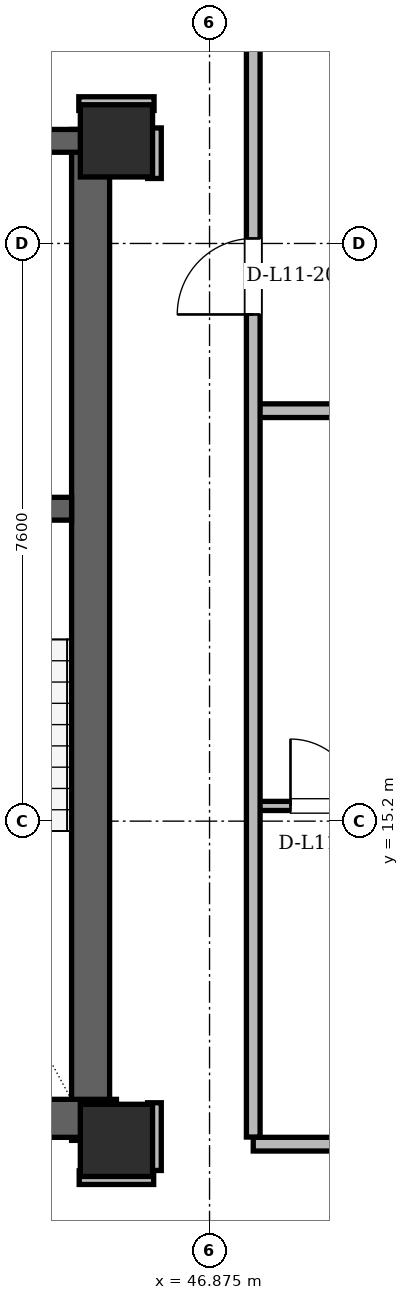
"""IFC4 building model, lengths in metres.
Left out: names, types, materials, properties, quantities, classifications, styles, units other than length and angle.
Written with IfcOpenShell. Run it as: python <this file> out.ifc"""

import sys

from ifc_helpers import new_model, si_unit, direction, frame, frame_2d, origin, origin_2d, place, context, subcontext, project, spatial, rectangle, hollow_rectangle, extrude, element, fill, save


model = new_model("IFC4")
c1 = context("Model", 3, precision=1e-05, world=origin(), true_north=direction((0.0, 1.0)))
c2 = subcontext(c1, "Body", "Model", "MODEL_VIEW")
j1 = project(units=[si_unit("LENGTHUNIT", "METRE"), si_unit("PLANEANGLEUNIT", "RADIAN")], contexts=[c1])
p1 = place(None, origin())
s1 = spatial("IfcSite", under=j1, at=p1, CompositionType="ELEMENT")
p2 = place(p1, origin())
s2 = spatial("IfcBuilding", under=s1, at=p2, CompositionType="ELEMENT")
p3 = place(p2, frame((0.0, 0.0, 45.3)))
s3 = spatial("IfcBuildingStorey", under=s2, at=p3, CompositionType="ELEMENT", Elevation=45.3)
for number, where, z_axis, x_axis in (
    (1, (45.65, 11.0, 0.0), (0.0, 0.0, 1.0), (1.0, 0.0, 0.0)),
    (2, (45.65, 24.15, 0.0), (0.0, 0.0, 1.0), (1.0, 0.0, 0.0)),
):
    element("IfcColumn", number, at=place(p3, frame(where, z_axis=z_axis, x_axis=x_axis)), inside=s3, PredefinedType="COLUMN", context=c2, shape_type="SweptSolid", body=[
        extrude(hollow_rectangle(XDim=0.95, YDim=0.95, WallThickness=0.08, at=origin_2d()), origin(), (0.0, 0.0, 1.0), 3.6),
    ])
p4 = place(p3, frame((45.31, 11.0, 0.0), z_axis=(0.0, 0.0, 1.0), x_axis=(0.0, 1.0, 0.0)))
e3 = element("IfcWall", 3, at=p4, inside=s3, PredefinedType="SHEAR", context=c2, shape_type="SweptSolid", body=[
    extrude(rectangle(XDim=13.3, YDim=0.5, at=frame_2d((6.65, 0.0))), origin(), (0.0, 0.0, 1.0), 3.36),
])
p5 = place(p3, frame((38.55, 11.29, 0.0), z_axis=(0.0, 0.0, 1.0), x_axis=(1.0, 0.0, 0.0)))
e4 = element("IfcWall", 4, at=p5, inside=s3, PredefinedType="SHEAR", context=c2, shape_type="SweptSolid", body=[
    extrude(rectangle(XDim=7.1, YDim=0.5, at=frame_2d((3.55, 0.0))), origin(), (0.0, 0.0, 1.0), 3.36),
])
p6 = place(p3, frame((29.65, 24.15, 0.0), z_axis=(0.0, 0.0, 1.0), x_axis=(1.0, 0.0, 0.0)))
e5 = element("IfcWall", 5, at=p6, inside=s3, PredefinedType="SHEAR", context=c2, shape_type="SweptSolid", body=[
    extrude(rectangle(XDim=15.7, YDim=0.3, at=frame_2d((7.85, 0.0))), origin(), (0.0, 0.0, 1.0), 3.36),
])
p7 = place(p6, frame((1.7, 0.0, 0.0)))
e6 = element("IfcOpeningElement", 6, at=p7, cuts=e5, PredefinedType="OPENING", context=c2, shape_type="SweptSolid", body=[
    extrude(rectangle(XDim=1.2, YDim=2.2, at=frame_2d((0.6, 1.1))), frame((0.0, 0.15, 0.0), z_axis=(0.0, -1.0, 0.0), x_axis=(1.0, 0.0, 0.0)), (0.0, 0.0, 1.0), 0.3),
])
p8 = place(p6, frame((12.8, 0.0, 0.0)))
e7 = element("IfcOpeningElement", 7, at=p8, cuts=e5, PredefinedType="OPENING", context=c2, shape_type="SweptSolid", body=[
    extrude(rectangle(XDim=1.2, YDim=2.2, at=frame_2d((0.6, 1.1))), frame((0.0, 0.15, 0.0), z_axis=(0.0, -1.0, 0.0), x_axis=(1.0, 0.0, 0.0)), (0.0, 0.0, 1.0), 0.3),
])
p9 = place(p6, frame((7.4, 0.0, 0.0)))
e8 = element("IfcOpeningElement", 8, at=p9, cuts=e5, PredefinedType="OPENING", context=c2, shape_type="SweptSolid", body=[
    extrude(rectangle(XDim=0.9, YDim=2.05, at=frame_2d((0.45, 1.025))), frame((0.0, 0.15, 0.0), z_axis=(0.0, -1.0, 0.0), x_axis=(1.0, 0.0, 0.0)), (0.0, 0.0, 1.0), 0.3),
])
p10 = place(p3, frame((41.05, 19.31, 0.0), z_axis=(0.0, 0.0, 1.0), x_axis=(1.0, 0.0, 0.0)))
e9 = element("IfcWall", 9, at=p10, inside=s3, PredefinedType="SHEAR", context=c2, shape_type="SweptSolid", body=[
    extrude(rectangle(XDim=4.01, YDim=0.3, at=frame_2d((2.005, 0.0))), origin(), (0.0, 0.0, 1.0), 3.36),
])
p11 = place(p10, frame((1.6, 0.0, 0.0)))
e10 = element("IfcOpeningElement", 10, at=p11, cuts=e9, PredefinedType="OPENING", context=c2, shape_type="SweptSolid", body=[
    extrude(rectangle(XDim=1.4, YDim=2.2, at=frame_2d((0.7, 1.1))), frame((0.0, 0.15, 0.0), z_axis=(0.0, -1.0, 0.0), x_axis=(1.0, 0.0, 0.0)), (0.0, 0.0, 1.0), 0.3),
])
p12 = place(p3, frame((61.584, 14.829, 0.0), z_axis=(0.0, 0.0, 1.0), x_axis=(-0.500004112523, 0.866023029405, 0.0)))
e11 = element("IfcWall", 11, at=p12, inside=s3, PredefinedType="SOLIDWALL", context=c2, shape_type="SweptSolid", body=[
    extrude(rectangle(XDim=33.214, YDim=0.34, at=frame_2d((16.607, 0.0))), origin(), (0.0, 0.0, 1.0), 2.494),
])
p13 = place(p12, frame((7.615, 0.0, 0.0)))
e12 = element("IfcOpeningElement", 12, at=p13, cuts=e11, PredefinedType="OPENING", context=c2, shape_type="SweptSolid", body=[
    extrude(rectangle(XDim=1.5, YDim=2.2, at=frame_2d((0.75, 1.1))), frame((0.0, 0.17, 0.0), z_axis=(0.0, -1.0, 0.0), x_axis=(1.0, 0.0, 0.0)), (0.0, 0.0, 1.0), 0.34),
])
p14 = place(p12, frame((24.925, 0.0, 0.0)))
e13 = element("IfcOpeningElement", 13, at=p14, cuts=e11, PredefinedType="OPENING", context=c2, shape_type="SweptSolid", body=[
    extrude(rectangle(XDim=1.5, YDim=2.2, at=frame_2d((0.75, 1.1))), frame((0.0, 0.17, 0.0), z_axis=(0.0, -1.0, 0.0), x_axis=(1.0, 0.0, 0.0)), (0.0, 0.0, 1.0), 0.34),
])
p15 = place(p12, frame((0.971, 0.0, 0.85)))
e14 = element("IfcOpeningElement", 14, at=p15, cuts=e11, PredefinedType="OPENING", context=c2, shape_type="SweptSolid", body=[
    extrude(rectangle(XDim=1.2, YDim=1.48, at=frame_2d((0.6, 0.74))), frame((0.0, 0.17, 0.0), z_axis=(0.0, -1.0, 0.0), x_axis=(1.0, 0.0, 0.0)), (0.0, 0.0, 1.0), 0.34),
])
p16 = place(p12, frame((2.462, 0.0, 0.85)))
e15 = element("IfcOpeningElement", 15, at=p16, cuts=e11, PredefinedType="OPENING", context=c2, shape_type="SweptSolid", body=[
    extrude(rectangle(XDim=1.2, YDim=1.48, at=frame_2d((0.6, 0.74))), frame((0.0, 0.17, 0.0), z_axis=(0.0, -1.0, 0.0), x_axis=(1.0, 0.0, 0.0)), (0.0, 0.0, 1.0), 0.34),
])
p17 = place(p12, frame((16.965, 0.0, 0.85)))
e16 = element("IfcOpeningElement", 16, at=p17, cuts=e11, PredefinedType="OPENING", context=c2, shape_type="SweptSolid", body=[
    extrude(rectangle(XDim=2.8, YDim=1.534, at=frame_2d((1.4, 0.767))), frame((0.0, 0.17, 0.0), z_axis=(0.0, -1.0, 0.0), x_axis=(1.0, 0.0, 0.0)), (0.0, 0.0, 1.0), 0.34),
])
p18 = place(p12, frame((10.823, 0.0, 0.85)))
e17 = element("IfcOpeningElement", 17, at=p18, cuts=e11, PredefinedType="OPENING", context=c2, shape_type="SweptSolid", body=[
    extrude(rectangle(XDim=1.2, YDim=1.48, at=frame_2d((0.6, 0.74))), frame((0.0, 0.17, 0.0), z_axis=(0.0, -1.0, 0.0), x_axis=(1.0, 0.0, 0.0)), (0.0, 0.0, 1.0), 0.34),
])
p19 = place(p12, frame((13.666, 0.0, 0.85)))
e18 = element("IfcOpeningElement", 18, at=p19, cuts=e11, PredefinedType="OPENING", context=c2, shape_type="SweptSolid", body=[
    extrude(rectangle(XDim=1.2, YDim=1.48, at=frame_2d((0.6, 0.74))), frame((0.0, 0.17, 0.0), z_axis=(0.0, -1.0, 0.0), x_axis=(1.0, 0.0, 0.0)), (0.0, 0.0, 1.0), 0.34),
])
p20 = place(p12, frame((5.859, 0.0, 0.85)))
e19 = element("IfcOpeningElement", 19, at=p20, cuts=e11, PredefinedType="OPENING", context=c2, shape_type="SweptSolid", body=[
    extrude(rectangle(XDim=0.9, YDim=1.15, at=frame_2d((0.45, 0.575))), frame((0.0, 0.17, 0.0), z_axis=(0.0, -1.0, 0.0), x_axis=(1.0, 0.0, 0.0)), (0.0, 0.0, 1.0), 0.34),
])
p21 = place(p3, frame((45.16, 10.51, 0.0), z_axis=(0.0, 0.0, 1.0), x_axis=(1.0, 0.0, 0.0)))
e20 = element("IfcWall", 20, at=p21, inside=s3, PredefinedType="PARTITIONING", context=c2, shape_type="SweptSolid", body=[
    extrude(rectangle(XDim=0.98, YDim=0.18, at=frame_2d((0.49, 0.0))), origin(), (0.0, 0.0, 1.0), 2.738),
])
p22 = place(p3, frame((47.45, 10.95, 0.0), z_axis=(0.0, 0.0, 1.0), x_axis=(1.0, 0.0, 0.0)))
e21 = element("IfcWall", 21, at=p22, inside=s3, PredefinedType="PARTITIONING", context=c2, shape_type="SweptSolid", body=[
    extrude(rectangle(XDim=8.35, YDim=0.18, at=frame_2d((4.175, 0.0))), origin(), (0.0, 0.0, 1.0), 3.36),
])
p23 = place(p3, frame((47.4, 15.4, 0.0), z_axis=(0.0, 0.0, 1.0), x_axis=(1.0, 0.0, 0.0)))
e22 = element("IfcWall", 22, at=p23, inside=s3, PredefinedType="PARTITIONING", context=c2, shape_type="SweptSolid", body=[
    extrude(rectangle(XDim=13.654, YDim=0.12, at=frame_2d((6.827, 0.0))), origin(), (0.0, 0.0, 1.0), 2.946),
])
p24 = place(p23, frame((0.54, 0.0, 0.0)))
e23 = element("IfcOpeningElement", 23, at=p24, cuts=e22, PredefinedType="OPENING", context=c2, shape_type="SweptSolid", body=[
    extrude(rectangle(XDim=0.88, YDim=2.08, at=frame_2d((0.44, 1.04))), frame((0.0, 0.06, 0.0), z_axis=(0.0, -1.0, 0.0), x_axis=(1.0, 0.0, 0.0)), (0.0, 0.0, 1.0), 0.12),
])
p25 = place(p23, frame((2.537, 0.0, 0.0)))
e24 = element("IfcOpeningElement", 24, at=p25, cuts=e22, PredefinedType="OPENING", context=c2, shape_type="SweptSolid", body=[
    extrude(rectangle(XDim=0.95, YDim=2.1, at=frame_2d((0.475, 1.05))), frame((0.0, 0.06, 0.0), z_axis=(0.0, -1.0, 0.0), x_axis=(1.0, 0.0, 0.0)), (0.0, 0.0, 1.0), 0.12),
])
p26 = place(p23, frame((4.909, 0.0, 0.0)))
e25 = element("IfcOpeningElement", 25, at=p26, cuts=e22, PredefinedType="OPENING", context=c2, shape_type="SweptSolid", body=[
    extrude(rectangle(XDim=0.95, YDim=2.1, at=frame_2d((0.475, 1.05))), frame((0.0, 0.06, 0.0), z_axis=(0.0, -1.0, 0.0), x_axis=(1.0, 0.0, 0.0)), (0.0, 0.0, 1.0), 0.12),
])
p27 = place(p23, frame((7.908, 0.0, 0.0)))
e26 = element("IfcOpeningElement", 26, at=p27, cuts=e22, PredefinedType="OPENING", context=c2, shape_type="SweptSolid", body=[
    extrude(rectangle(XDim=0.92, YDim=2.12, at=frame_2d((0.46, 1.06))), frame((0.0, 0.06, 0.0), z_axis=(0.0, -1.0, 0.0), x_axis=(1.0, 0.0, 0.0)), (0.0, 0.0, 1.0), 0.12),
])
p28 = place(p23, frame((11.422, 0.0, 0.0)))
e27 = element("IfcOpeningElement", 27, at=p28, cuts=e22, PredefinedType="OPENING", context=c2, shape_type="SweptSolid", body=[
    extrude(rectangle(XDim=0.92, YDim=2.12, at=frame_2d((0.46, 1.06))), frame((0.0, 0.06, 0.0), z_axis=(0.0, -1.0, 0.0), x_axis=(1.0, 0.0, 0.0)), (0.0, 0.0, 1.0), 0.12),
])
p29 = place(p3, frame((47.45, 20.6, 0.0), z_axis=(0.0, 0.0, 1.0), x_axis=(1.0, 0.0, 0.0)))
e28 = element("IfcWall", 28, at=p29, inside=s3, PredefinedType="PARTITIONING", context=c2, shape_type="SweptSolid", body=[
    extrude(rectangle(XDim=10.602, YDim=0.18, at=frame_2d((5.301, 0.0))), origin(), (0.0, 0.0, 1.0), 2.494),
])
p30 = place(p3, frame((45.155, 24.64, 0.0), z_axis=(0.0, 0.0, 1.0), x_axis=(1.0, 0.0, 0.0)))
e29 = element("IfcWall", 29, at=p30, inside=s3, PredefinedType="PARTITIONING", context=c2, shape_type="SweptSolid", body=[
    extrude(rectangle(XDim=0.99, YDim=0.18, at=frame_2d((0.495, 0.0))), origin(), (0.0, 0.0, 1.0), 2.738),
])
p31 = place(p3, frame((46.15, 10.604, 0.0), z_axis=(0.0, 0.0, 1.0), x_axis=(0.0, 1.0, 0.0)))
e30 = element("IfcWall", 30, at=p31, inside=s3, PredefinedType="PARTITIONING", context=c2, shape_type="SweptSolid", body=[
    extrude(rectangle(XDim=0.891, YDim=0.18, at=frame_2d((0.446, 0.0))), origin(), (0.0, 0.0, 1.0), 2.738),
])
p32 = place(p3, frame((46.15, 23.655, 0.0), z_axis=(0.0, 0.0, 1.0), x_axis=(0.0, 1.0, 0.0)))
e31 = element("IfcWall", 31, at=p32, inside=s3, PredefinedType="PARTITIONING", context=c2, shape_type="SweptSolid", body=[
    extrude(rectangle(XDim=0.665, YDim=0.18, at=frame_2d((0.333, 0.0))), origin(), (0.0, 0.0, 1.0), 3.36),
])
p33 = place(p3, frame((47.45, 11.044, 0.0), z_axis=(0.0, 0.0, 1.0), x_axis=(0.0, 1.0, 0.0)))
e32 = element("IfcWall", 32, at=p33, inside=s3, PredefinedType="PARTITIONING", context=c2, shape_type="SweptSolid", body=[
    extrude(rectangle(XDim=27.715, YDim=0.18, at=frame_2d((13.858, 0.0))), origin(), (0.0, 0.0, 1.0), 2.738),
])
p34 = place(p33, frame((10.822, 0.0, 0.0)))
e33 = element("IfcOpeningElement", 33, at=p34, cuts=e32, PredefinedType="OPENING", context=c2, shape_type="SweptSolid", body=[
    extrude(rectangle(XDim=1.0, YDim=2.18, at=frame_2d((0.5, 1.09))), frame((0.0, 0.09, 0.0), z_axis=(0.0, -1.0, 0.0), x_axis=(1.0, 0.0, 0.0)), (0.0, 0.0, 1.0), 0.18),
])
p35 = place(p24, origin())
e34 = element("IfcDoor", 34, at=p35, inside=s3, OperationType="SINGLE_SWING_LEFT", PredefinedType="DOOR", context=c2, shape_type="SweptSolid", body=[
    extrude(rectangle(XDim=0.88, YDim=2.08, at=frame_2d((0.44, 1.04))), frame((0.0, 0.025, 0.0), z_axis=(0.0, -1.0, 0.0), x_axis=(1.0, 0.0, 0.0)), (0.0, 0.0, 1.0), 0.05),
])
fill(e23, e34)
p36 = place(p34, origin())
e35 = element("IfcDoor", 35, at=p36, inside=s3, OperationType="SINGLE_SWING_LEFT", PredefinedType="DOOR", context=c2, shape_type="SweptSolid", body=[
    extrude(rectangle(XDim=1.0, YDim=2.18, at=frame_2d((0.5, 1.09))), frame((0.0, 0.025, 0.0), z_axis=(0.0, -1.0, 0.0), x_axis=(1.0, 0.0, 0.0)), (0.0, 0.0, 1.0), 0.05),
])
fill(e33, e35)
save(model, sys.argv[1])
